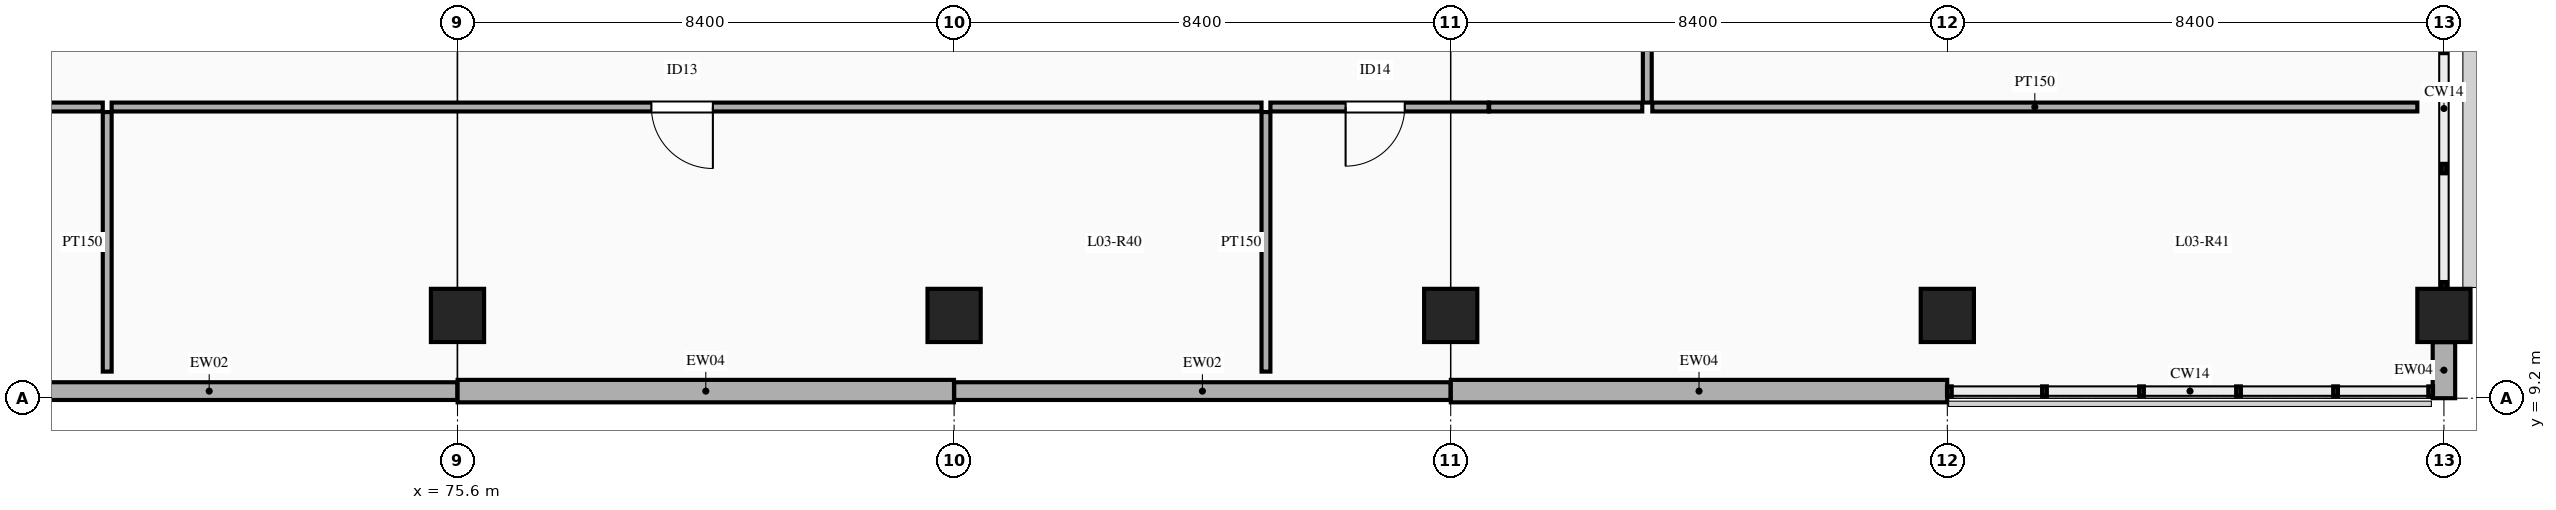
"""IFC4 building model, lengths in metres.
Left out: names, types, materials, properties, quantities, classifications, styles, units other than length and angle.
Written with IfcOpenShell. Run it as: python <this file> out.ifc"""

import sys

from ifc_helpers import new_model, si_unit, direction, frame, frame_2d, origin, origin_2d, place, context, subcontext, project, spatial, rectangle, extrude, element, fill, save


model = new_model("IFC4")
c1 = context("Model", 3, precision=1e-05, world=origin(), true_north=direction((0.0, 1.0)))
c2 = subcontext(c1, "Body", "Model", "MODEL_VIEW")
j1 = project(units=[si_unit("LENGTHUNIT", "METRE"), si_unit("PLANEANGLEUNIT", "RADIAN")], contexts=[c1])
p1 = place(None, origin())
s1 = spatial("IfcSite", under=j1, at=p1, CompositionType="ELEMENT")
p2 = place(p1, origin())
s2 = spatial("IfcBuilding", under=s1, at=p2, CompositionType="ELEMENT")
p3 = place(p2, frame((0.0, 0.0, 15.0)))
s3 = spatial("IfcBuildingStorey", under=s2, at=p3, CompositionType="ELEMENT", Elevation=15.0)
for number, where, z_axis, x_axis in (
    (1, (75.6, 10.6, 0.0), (0.0, 0.0, 1.0), (1.0, 0.0, 0.0)),
    (2, (84.0, 10.6, 0.0), (0.0, 0.0, 1.0), (1.0, 0.0, 0.0)),
    (3, (92.4, 10.6, 0.0), (0.0, 0.0, 1.0), (1.0, 0.0, 0.0)),
    (4, (100.8, 10.6, 0.0), (0.0, 0.0, 1.0), (1.0, 0.0, 0.0)),
    (5, (109.2, 10.6, 0.0), (0.0, 0.0, 1.0), (1.0, 0.0, 0.0)),
):
    element("IfcColumn", number, at=place(p3, frame(where, z_axis=z_axis, x_axis=x_axis)), inside=s3, PredefinedType="COLUMN", context=c2, shape_type="SweptSolid", body=[
        extrude(rectangle(XDim=0.9, YDim=0.9, at=origin_2d()), origin(), (0.0, 0.0, 1.0), 4.5),
    ])
p4 = place(p3, frame((109.2, 9.2, 0.0), z_axis=(0.0, 0.0, 1.0), x_axis=(0.0, 1.0, 0.0)))
e6 = element("IfcWall", 6, at=p4, inside=s3, PredefinedType="SOLIDWALL", context=c2, shape_type="SweptSolid", body=[
    extrude(rectangle(XDim=0.948, YDim=0.38, at=frame_2d((0.474, 0.0))), origin(), (0.0, 0.0, 1.0), 3.55),
])
p5 = place(p3, frame((67.202, 9.32, 0.0), z_axis=(0.0, 0.0, 1.0), x_axis=(1.0, 0.0, 0.0)))
e7 = element("IfcWall", 7, at=p5, inside=s3, PredefinedType="SOLIDWALL", context=c2, shape_type="SweptSolid", body=[
    extrude(rectangle(XDim=8.396, YDim=0.3, at=frame_2d((4.198, 0.0))), origin(), (0.0, 0.0, 1.0), 3.55),
])
p6 = place(p3, frame((75.602, 9.32, 0.0), z_axis=(0.0, 0.0, 1.0), x_axis=(1.0, 0.0, 0.0)))
e8 = element("IfcWall", 8, at=p6, inside=s3, PredefinedType="SOLIDWALL", context=c2, shape_type="SweptSolid", body=[
    extrude(rectangle(XDim=8.396, YDim=0.38, at=frame_2d((4.198, 0.0))), origin(), (0.0, 0.0, 1.0), 3.55),
])
p7 = place(p3, frame((84.002, 9.32, 0.0), z_axis=(0.0, 0.0, 1.0), x_axis=(1.0, 0.0, 0.0)))
e9 = element("IfcWall", 9, at=p7, inside=s3, PredefinedType="SOLIDWALL", context=c2, shape_type="SweptSolid", body=[
    extrude(rectangle(XDim=8.396, YDim=0.3, at=frame_2d((4.198, 0.0))), origin(), (0.0, 0.0, 1.0), 3.55),
])
p8 = place(p3, frame((92.402, 9.32, 0.0), z_axis=(0.0, 0.0, 1.0), x_axis=(1.0, 0.0, 0.0)))
e10 = element("IfcWall", 10, at=p8, inside=s3, PredefinedType="SOLIDWALL", context=c2, shape_type="SweptSolid", body=[
    extrude(rectangle(XDim=8.396, YDim=0.38, at=frame_2d((4.198, 0.0))), origin(), (0.0, 0.0, 1.0), 3.55),
])
p9 = place(p3, frame((95.725, 14.2, 0.0), z_axis=(0.0, 0.0, 1.0), x_axis=(0.0, 1.0, 0.0)))
e11 = element("IfcWall", 11, at=p9, inside=s3, PredefinedType="PARTITIONING", context=c2, shape_type="SweptSolid", body=[
    extrude(rectangle(XDim=8.69, YDim=0.15, at=frame_2d((4.345, 0.0))), origin(), (0.0, 0.0, 1.0), 3.45),
])
p10 = place(p3, frame((93.05, 14.125, 0.0), z_axis=(0.0, 0.0, 1.0), x_axis=(1.0, 0.0, 0.0)))
e12 = element("IfcWall", 12, at=p10, inside=s3, PredefinedType="PARTITIONING", context=c2, shape_type="SweptSolid", body=[
    extrude(rectangle(XDim=2.59, YDim=0.15, at=frame_2d((1.295, 0.0))), origin(), (0.0, 0.0, 1.0), 3.45),
])
p11 = place(p3, frame((58.16, 14.125, 0.0), z_axis=(0.0, 0.0, 1.0), x_axis=(1.0, 0.0, 0.0)))
e13 = element("IfcWall", 13, at=p11, inside=s3, PredefinedType="PARTITIONING", context=c2, shape_type="SweptSolid", body=[
    extrude(rectangle(XDim=11.44, YDim=0.15, at=frame_2d((5.72, 0.0))), origin(), (0.0, 0.0, 1.0), 3.45),
])
p12 = place(p11, frame((5.22, 0.0, 0.0)))
e14 = element("IfcOpeningElement", 14, at=p12, cuts=e13, PredefinedType="OPENING", context=c2, shape_type="SweptSolid", body=[
    extrude(rectangle(XDim=1.0, YDim=2.15, at=frame_2d((0.5, 1.075))), frame((0.0, 0.085, 0.0), z_axis=(0.0, -1.0, 0.0), x_axis=(1.0, 0.0, 0.0)), (0.0, 0.0, 1.0), 0.17),
])
p13 = place(p3, frame((69.75, 14.125, 0.0), z_axis=(0.0, 0.0, 1.0), x_axis=(1.0, 0.0, 0.0)))
e15 = element("IfcWall", 15, at=p13, inside=s3, PredefinedType="PARTITIONING", context=c2, shape_type="SweptSolid", body=[
    extrude(rectangle(XDim=19.45, YDim=0.15, at=frame_2d((9.725, 0.0))), origin(), (0.0, 0.0, 1.0), 3.45),
])
p14 = place(p13, frame((9.13, 0.0, 0.0)))
e16 = element("IfcOpeningElement", 16, at=p14, cuts=e15, PredefinedType="OPENING", context=c2, shape_type="SweptSolid", body=[
    extrude(rectangle(XDim=1.04, YDim=2.15, at=frame_2d((0.52, 1.075))), frame((0.0, 0.085, 0.0), z_axis=(0.0, -1.0, 0.0), x_axis=(1.0, 0.0, 0.0)), (0.0, 0.0, 1.0), 0.17),
])
p15 = place(p3, frame((89.35, 14.125, 0.0), z_axis=(0.0, 0.0, 1.0), x_axis=(1.0, 0.0, 0.0)))
e17 = element("IfcWall", 17, at=p15, inside=s3, PredefinedType="PARTITIONING", context=c2, shape_type="SweptSolid", body=[
    extrude(rectangle(XDim=3.69, YDim=0.15, at=frame_2d((1.845, 0.0))), origin(), (0.0, 0.0, 1.0), 3.45),
])
p16 = place(p15, frame((1.272, 0.0, 0.0)))
e18 = element("IfcOpeningElement", 18, at=p16, cuts=e17, PredefinedType="OPENING", context=c2, shape_type="SweptSolid", body=[
    extrude(rectangle(XDim=1.0, YDim=2.15, at=frame_2d((0.5, 1.075))), frame((0.0, 0.085, 0.0), z_axis=(0.0, -1.0, 0.0), x_axis=(1.0, 0.0, 0.0)), (0.0, 0.0, 1.0), 0.17),
])
p17 = place(p3, frame((95.81, 14.125, 0.0), z_axis=(0.0, 0.0, 1.0), x_axis=(1.0, 0.0, 0.0)))
e19 = element("IfcWall", 19, at=p17, inside=s3, PredefinedType="PARTITIONING", context=c2, shape_type="SweptSolid", body=[
    extrude(rectangle(XDim=12.94, YDim=0.15, at=frame_2d((6.47, 0.0))), origin(), (0.0, 0.0, 1.0), 3.45),
])
for number, where, z_axis, x_axis in (
    (20, (69.675, 9.65, 0.0), (0.0, 0.0, 1.0), (0.0, 1.0, 0.0)),
    (21, (89.275, 9.65, 0.0), (0.0, 0.0, 1.0), (0.0, 1.0, 0.0)),
):
    element("IfcWall", number, at=place(p3, frame(where, z_axis=z_axis, x_axis=x_axis)), inside=s3, PredefinedType="PARTITIONING", context=c2, shape_type="SweptSolid", body=[
        extrude(rectangle(XDim=4.39, YDim=0.15, at=frame_2d((2.195, 0.0))), origin(), (0.0, 0.0, 1.0), 3.45),
    ])
p18 = place(p14, frame((1.04, 0.0, 0.0), z_axis=(0.0, 0.0, 1.0), x_axis=(-1.0, 0.0, 0.0)))
e22 = element("IfcDoor", 22, at=p18, inside=s3, OperationType="SINGLE_SWING_LEFT", PredefinedType="DOOR", context=c2, shape_type="SweptSolid", body=[
    extrude(rectangle(XDim=1.04, YDim=2.15, at=frame_2d((0.52, 1.075))), frame((0.0, 0.025, 0.0), z_axis=(0.0, -1.0, 0.0), x_axis=(1.0, 0.0, 0.0)), (0.0, 0.0, 1.0), 0.05),
])
fill(e16, e22)
p19 = place(p16, frame((1.0, 0.0, 0.0), z_axis=(0.0, 0.0, 1.0), x_axis=(-1.0, 0.0, 0.0)))
e23 = element("IfcDoor", 23, at=p19, inside=s3, OperationType="SINGLE_SWING_RIGHT", PredefinedType="DOOR", context=c2, shape_type="SweptSolid", body=[
    extrude(rectangle(XDim=1.0, YDim=2.15, at=frame_2d((0.5, 1.075))), frame((0.0, 0.025, 0.0), z_axis=(0.0, -1.0, 0.0), x_axis=(1.0, 0.0, 0.0)), (0.0, 0.0, 1.0), 0.05),
])
fill(e18, e23)
save(model, sys.argv[1])
